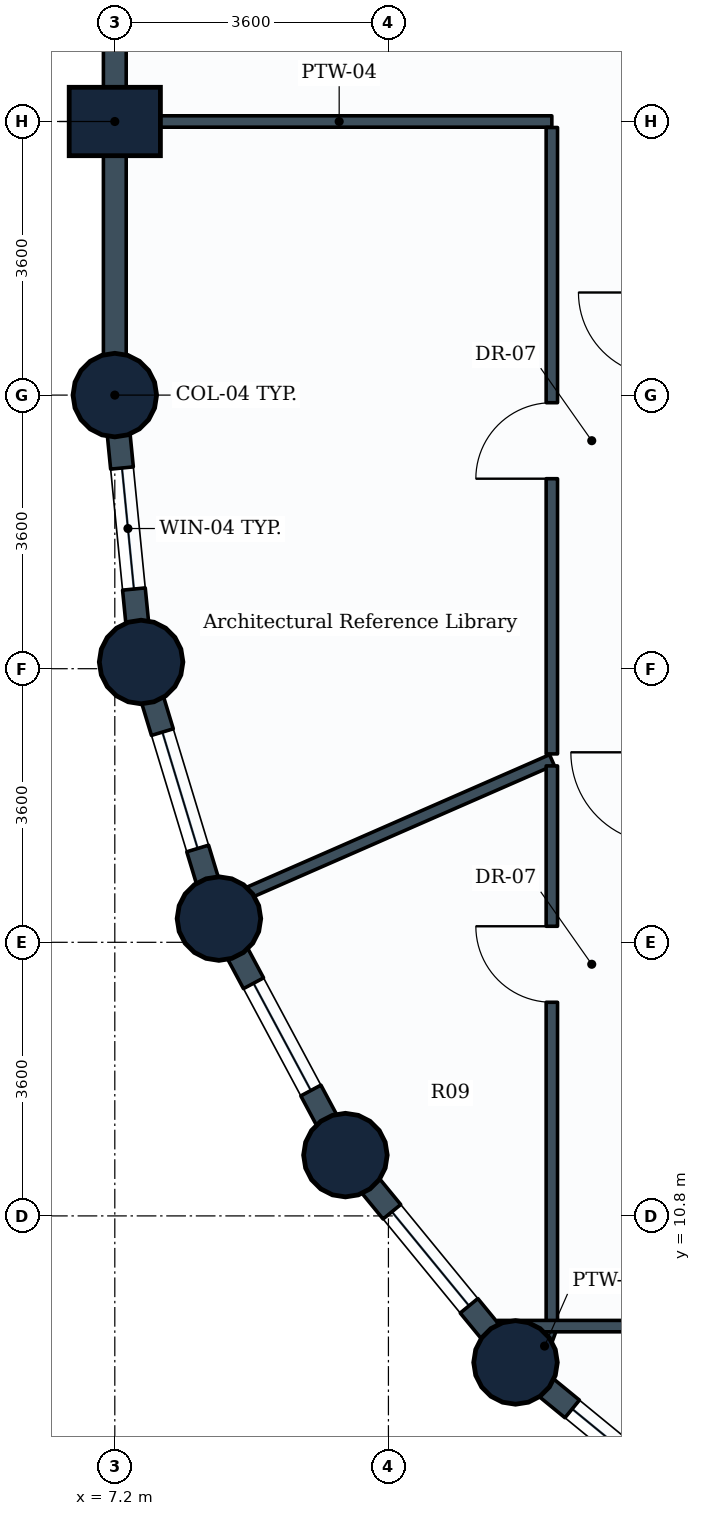
"""IFC4 building model, lengths in metres.
Left out: names, types, materials, properties, quantities, classifications, styles, units other than length and angle.
Written with IfcOpenShell. Run it as: python <this file> out.ifc"""

import sys

from ifc_helpers import new_model, si_unit, direction, frame, frame_2d, origin, origin_2d, place, context, subcontext, project, spatial, rectangle, circle, extrude, element, fill, save


model = new_model("IFC4")
c1 = context("Model", 3, precision=1e-05, world=origin(), true_north=direction((0.0, 1.0)))
c2 = subcontext(c1, "Body", "Model", "MODEL_VIEW")
j1 = project(units=[si_unit("LENGTHUNIT", "METRE"), si_unit("PLANEANGLEUNIT", "RADIAN")], contexts=[c1])
p1 = place(None, origin())
s1 = spatial("IfcSite", under=j1, at=p1, CompositionType="ELEMENT")
p2 = place(p1, origin())
s2 = spatial("IfcBuilding", under=s1, at=p2, CompositionType="ELEMENT")
p3 = place(p2, frame((0.0, 0.0, 43.5)))
s3 = spatial("IfcBuildingStorey", under=s2, at=p3, CompositionType="ELEMENT", Elevation=43.5)
p4 = place(p3, frame((7.2, 21.6, 0.0), z_axis=(0.0, 0.0, 1.0), x_axis=(1.0, 0.0, 0.0)))
e1 = element("IfcColumn", 1, at=p4, inside=s3, PredefinedType="COLUMN", context=c2, shape_type="SweptSolid", body=[
    extrude(circle(Radius=0.55, at=origin_2d()), origin(), (0.0, 0.0, 1.0), 3.9),
])
p5 = place(p3, frame((7.2, 25.2, 0.0), z_axis=(0.0, 0.0, 1.0), x_axis=(0.0, 1.0, 0.0)))
e2 = element("IfcColumn", 2, at=p5, inside=s3, PredefinedType="COLUMN", context=c2, shape_type="SweptSolid", body=[
    extrude(rectangle(XDim=0.9, YDim=1.2, at=origin_2d()), origin(), (0.0, 0.0, 1.0), 3.9),
])
for number, where, z_axis, x_axis in (
    (3, (7.546, 18.088, 0.0), (0.0, 0.0, 1.0), (1.0, 0.0, 0.0)),
    (4, (8.57, 14.712, 0.0), (0.0, 0.0, 1.0), (1.0, 0.0, 0.0)),
    (5, (10.234, 11.6, 0.0), (0.0, 0.0, 1.0), (1.0, 0.0, 0.0)),
    (6, (12.472, 8.872, 0.0), (0.0, 0.0, 1.0), (1.0, 0.0, 0.0)),
):
    element("IfcColumn", number, at=place(p3, frame(where, z_axis=z_axis, x_axis=x_axis)), inside=s3, PredefinedType="COLUMN", context=c2, shape_type="SweptSolid", body=[
        extrude(circle(Radius=0.55, at=origin_2d()), origin(), (0.0, 0.0, 1.0), 3.9),
    ])
p6 = place(p3, frame((7.2, 25.2, 0.0), z_axis=(0.0, 0.0, 1.0), x_axis=(0.0, 1.0, 0.0)))
e7 = element("IfcWall", 7, at=p6, inside=s3, PredefinedType="STANDARD", context=c2, shape_type="SweptSolid", body=[
    extrude(rectangle(XDim=3.6, YDim=0.3, at=frame_2d((1.8, 0.0))), origin(), (0.0, 0.0, 1.0), 2.93),
])
p7 = place(p3, frame((7.2, 21.6, 0.0), z_axis=(0.0, 0.0, 1.0), x_axis=(0.0, 1.0, 0.0)))
e8 = element("IfcWall", 8, at=p7, inside=s3, PredefinedType="STANDARD", context=c2, shape_type="SweptSolid", body=[
    extrude(rectangle(XDim=3.6, YDim=0.3, at=frame_2d((1.8, 0.0))), origin(), (0.0, 0.0, 1.0), 2.93),
])
p8 = place(p3, frame((7.546, 18.088, 0.0), z_axis=(0.0, 0.0, 1.0), x_axis=(-0.09802417461, 0.995184033831, 0.0)))
e9 = element("IfcWall", 9, at=p8, inside=s3, PredefinedType="STANDARD", context=c2, shape_type="SweptSolid", body=[
    extrude(rectangle(XDim=3.529, YDim=0.3, at=frame_2d((1.765, 0.0))), origin(), (0.0, 0.0, 1.0), 2.93),
])
p9 = place(p8, frame((0.965, 0.0, 0.85)))
e10 = element("IfcOpeningElement", 10, at=p9, cuts=e9, PredefinedType="OPENING", context=c2, shape_type="SweptSolid", body=[
    extrude(rectangle(XDim=1.6, YDim=1.35, at=frame_2d((0.8, 0.675))), frame((0.0, 0.16, 0.0), z_axis=(0.0, -1.0, 0.0), x_axis=(1.0, 0.0, 0.0)), (0.0, 0.0, 1.0), 0.32),
])
p10 = place(p3, frame((8.57, 14.712, 0.0), z_axis=(0.0, 0.0, 1.0), x_axis=(-0.290305086481, 0.956934144423, 0.0)))
e11 = element("IfcWall", 11, at=p10, inside=s3, PredefinedType="STANDARD", context=c2, shape_type="SweptSolid", body=[
    extrude(rectangle(XDim=3.528, YDim=0.3, at=frame_2d((1.764, 0.0))), origin(), (0.0, 0.0, 1.0), 2.93),
])
p11 = place(p10, frame((0.964, 0.0, 0.85)))
e12 = element("IfcOpeningElement", 12, at=p11, cuts=e11, PredefinedType="OPENING", context=c2, shape_type="SweptSolid", body=[
    extrude(rectangle(XDim=1.6, YDim=1.35, at=frame_2d((0.8, 0.675))), frame((0.0, 0.16, 0.0), z_axis=(0.0, -1.0, 0.0), x_axis=(1.0, 0.0, 0.0)), (0.0, 0.0, 1.0), 0.32),
])
p12 = place(p3, frame((10.234, 11.6, 0.0), z_axis=(0.0, 0.0, 1.0), x_axis=(-0.47151087309, 0.881860247748, 0.0)))
e13 = element("IfcWall", 13, at=p12, inside=s3, PredefinedType="STANDARD", context=c2, shape_type="SweptSolid", body=[
    extrude(rectangle(XDim=3.529, YDim=0.3, at=frame_2d((1.764, 0.0))), origin(), (0.0, 0.0, 1.0), 2.93),
])
p13 = place(p12, frame((0.964, 0.0, 0.85)))
e14 = element("IfcOpeningElement", 14, at=p13, cuts=e13, PredefinedType="OPENING", context=c2, shape_type="SweptSolid", body=[
    extrude(rectangle(XDim=1.6, YDim=1.35, at=frame_2d((0.8, 0.675))), frame((0.0, 0.16, 0.0), z_axis=(0.0, -1.0, 0.0), x_axis=(1.0, 0.0, 0.0)), (0.0, 0.0, 1.0), 0.32),
])
p14 = place(p3, frame((12.472, 8.872, 0.0), z_axis=(0.0, 0.0, 1.0), x_axis=(-0.634258295121, 0.773121216285, 0.0)))
e15 = element("IfcWall", 15, at=p14, inside=s3, PredefinedType="STANDARD", context=c2, shape_type="SweptSolid", body=[
    extrude(rectangle(XDim=3.529, YDim=0.3, at=frame_2d((1.764, 0.0))), origin(), (0.0, 0.0, 1.0), 2.93),
])
p15 = place(p14, frame((0.964, 0.0, 0.85)))
e16 = element("IfcOpeningElement", 16, at=p15, cuts=e15, PredefinedType="OPENING", context=c2, shape_type="SweptSolid", body=[
    extrude(rectangle(XDim=1.6, YDim=1.35, at=frame_2d((0.8, 0.675))), frame((0.0, 0.16, 0.0), z_axis=(0.0, -1.0, 0.0), x_axis=(1.0, 0.0, 0.0)), (0.0, 0.0, 1.0), 0.32),
])
p16 = place(p3, frame((15.2, 6.634, 0.0), z_axis=(0.0, 0.0, 1.0), x_axis=(-0.773121216285, 0.634258295121, 0.0)))
e17 = element("IfcWall", 17, at=p16, inside=s3, PredefinedType="STANDARD", context=c2, shape_type="SweptSolid", body=[
    extrude(rectangle(XDim=3.529, YDim=0.3, at=frame_2d((1.764, 0.0))), origin(), (0.0, 0.0, 1.0), 2.93),
])
p17 = place(p16, frame((0.964, 0.0, 0.85)))
e18 = element("IfcOpeningElement", 18, at=p17, cuts=e17, PredefinedType="OPENING", context=c2, shape_type="SweptSolid", body=[
    extrude(rectangle(XDim=1.6, YDim=1.35, at=frame_2d((0.8, 0.675))), frame((0.0, 0.16, 0.0), z_axis=(0.0, -1.0, 0.0), x_axis=(1.0, 0.0, 0.0)), (0.0, 0.0, 1.0), 0.32),
])
p18 = place(p3, frame((7.354, 25.2, 0.0), z_axis=(0.0, 0.0, 1.0), x_axis=(1.0, 0.0, 0.0)))
e19 = element("IfcWall", 19, at=p18, inside=s3, PredefinedType="PARTITIONING", context=c2, shape_type="SweptSolid", body=[
    extrude(rectangle(XDim=5.596, YDim=0.15, at=frame_2d((2.798, 0.0))), origin(), (0.0, 0.0, 1.0), 3.635),
])
p19 = place(p3, frame((12.95, 16.8, 0.0), z_axis=(0.0, 0.0, 1.0), x_axis=(-0.916088262031, -0.400976677837, 0.0)))
e20 = element("IfcWall", 20, at=p19, inside=s3, PredefinedType="PARTITIONING", context=c2, shape_type="SweptSolid", body=[
    extrude(rectangle(XDim=4.706, YDim=0.15, at=frame_2d((2.353, 0.0))), origin(), (0.0, 0.0, 1.0), 2.93),
])
p20 = place(p3, frame((12.95, 9.35, 0.0), z_axis=(0.0, 0.0, 1.0), x_axis=(-0.341918365566, -0.939729658619, 0.0)))
e21 = element("IfcWall", 21, at=p20, inside=s3, PredefinedType="PARTITIONING", context=c2, shape_type="SweptSolid", body=[
    extrude(rectangle(XDim=0.559, YDim=0.15, at=frame_2d((0.28, 0.0))), origin(), (0.0, 0.0, 1.0), 2.93),
])
p21 = place(p3, frame((12.95, 16.879, 0.0), z_axis=(0.0, 0.0, 1.0), x_axis=(0.0, 1.0, 0.0)))
e22 = element("IfcWall", 22, at=p21, inside=s3, PredefinedType="PARTITIONING", context=c2, shape_type="SweptSolid", body=[
    extrude(rectangle(XDim=8.242, YDim=0.15, at=frame_2d((4.121, 0.0))), origin(), (0.0, 0.0, 1.0), 3.08),
])
p22 = place(p21, frame((3.621, 0.0, 0.0)))
e23 = element("IfcOpeningElement", 23, at=p22, cuts=e22, PredefinedType="OPENING", context=c2, shape_type="SweptSolid", body=[
    extrude(rectangle(XDim=1.0, YDim=2.1, at=frame_2d((0.5, 1.05))), frame((0.0, 0.085, 0.0), z_axis=(0.0, -1.0, 0.0), x_axis=(1.0, 0.0, 0.0)), (0.0, 0.0, 1.0), 0.17),
])
p23 = place(p3, frame((12.95, 9.35, 0.0), z_axis=(0.0, 0.0, 1.0), x_axis=(0.0, 1.0, 0.0)))
e24 = element("IfcWall", 24, at=p23, inside=s3, PredefinedType="PARTITIONING", context=c2, shape_type="SweptSolid", body=[
    extrude(rectangle(XDim=7.371, YDim=0.15, at=frame_2d((3.686, 0.0))), origin(), (0.0, 0.0, 1.0), 3.04),
])
p24 = place(p23, frame((4.261, 0.0, 0.0)))
e25 = element("IfcOpeningElement", 25, at=p24, cuts=e24, PredefinedType="OPENING", context=c2, shape_type="SweptSolid", body=[
    extrude(rectangle(XDim=1.0, YDim=2.1, at=frame_2d((0.5, 1.05))), frame((0.0, 0.085, 0.0), z_axis=(0.0, -1.0, 0.0), x_axis=(1.0, 0.0, 0.0)), (0.0, 0.0, 1.0), 0.17),
])
p25 = place(p3, frame((12.234, 9.35, 0.0), z_axis=(0.0, 0.0, 1.0), x_axis=(1.0, 0.0, 0.0)))
e26 = element("IfcWall", 26, at=p25, inside=s3, PredefinedType="PARTITIONING", context=c2, shape_type="SweptSolid", body=[
    extrude(rectangle(XDim=8.087, YDim=0.15, at=frame_2d((4.043, 0.0))), origin(), (0.0, 0.0, 1.0), 2.93),
])
p26 = place(p25, frame((4.977, 0.0, 0.0)))
e27 = element("IfcOpeningElement", 27, at=p26, cuts=e26, PredefinedType="OPENING", context=c2, shape_type="SweptSolid", body=[
    extrude(rectangle(XDim=1.0, YDim=2.1, at=frame_2d((0.5, 1.05))), frame((0.0, 0.085, 0.0), z_axis=(0.0, -1.0, 0.0), x_axis=(1.0, 0.0, 0.0)), (0.0, 0.0, 1.0), 0.17),
])
p27 = place(p9, origin())
e28 = element("IfcWindow", 28, at=p27, inside=s3, PartitioningType="SINGLE_PANEL", PredefinedType="WINDOW", context=c2, shape_type="SweptSolid", body=[
    extrude(rectangle(XDim=1.6, YDim=1.35, at=frame_2d((0.8, 0.675))), frame((0.0, 0.03, 0.0), z_axis=(0.0, -1.0, 0.0), x_axis=(1.0, 0.0, 0.0)), (0.0, 0.0, 1.0), 0.06),
])
fill(e10, e28)
p28 = place(p11, origin())
e29 = element("IfcWindow", 29, at=p28, inside=s3, PartitioningType="SINGLE_PANEL", PredefinedType="WINDOW", context=c2, shape_type="SweptSolid", body=[
    extrude(rectangle(XDim=1.6, YDim=1.35, at=frame_2d((0.8, 0.675))), frame((0.0, 0.03, 0.0), z_axis=(0.0, -1.0, 0.0), x_axis=(1.0, 0.0, 0.0)), (0.0, 0.0, 1.0), 0.06),
])
fill(e12, e29)
p29 = place(p13, origin())
e30 = element("IfcWindow", 30, at=p29, inside=s3, PartitioningType="SINGLE_PANEL", PredefinedType="WINDOW", context=c2, shape_type="SweptSolid", body=[
    extrude(rectangle(XDim=1.6, YDim=1.35, at=frame_2d((0.8, 0.675))), frame((0.0, 0.03, 0.0), z_axis=(0.0, -1.0, 0.0), x_axis=(1.0, 0.0, 0.0)), (0.0, 0.0, 1.0), 0.06),
])
fill(e14, e30)
p30 = place(p15, origin())
e31 = element("IfcWindow", 31, at=p30, inside=s3, PartitioningType="SINGLE_PANEL", PredefinedType="WINDOW", context=c2, shape_type="SweptSolid", body=[
    extrude(rectangle(XDim=1.6, YDim=1.35, at=frame_2d((0.8, 0.675))), frame((0.0, 0.03, 0.0), z_axis=(0.0, -1.0, 0.0), x_axis=(1.0, 0.0, 0.0)), (0.0, 0.0, 1.0), 0.06),
])
fill(e16, e31)
p31 = place(p17, origin())
e32 = element("IfcWindow", 32, at=p31, inside=s3, PartitioningType="SINGLE_PANEL", PredefinedType="WINDOW", context=c2, shape_type="SweptSolid", body=[
    extrude(rectangle(XDim=1.6, YDim=1.35, at=frame_2d((0.8, 0.675))), frame((0.0, 0.03, 0.0), z_axis=(0.0, -1.0, 0.0), x_axis=(1.0, 0.0, 0.0)), (0.0, 0.0, 1.0), 0.06),
])
fill(e18, e32)
p32 = place(p22, origin())
e33 = element("IfcDoor", 33, at=p32, inside=s3, OperationType="SINGLE_SWING_LEFT", PredefinedType="DOOR", context=c2, shape_type="SweptSolid", body=[
    extrude(rectangle(XDim=1.0, YDim=2.1, at=frame_2d((0.5, 1.05))), frame((0.0, 0.025, 0.0), z_axis=(0.0, -1.0, 0.0), x_axis=(1.0, 0.0, 0.0)), (0.0, 0.0, 1.0), 0.05),
])
fill(e23, e33)
p33 = place(p24, origin())
e34 = element("IfcDoor", 34, at=p33, inside=s3, OperationType="SINGLE_SWING_RIGHT", PredefinedType="DOOR", context=c2, shape_type="SweptSolid", body=[
    extrude(rectangle(XDim=1.0, YDim=2.1, at=frame_2d((0.5, 1.05))), frame((0.0, 0.025, 0.0), z_axis=(0.0, -1.0, 0.0), x_axis=(1.0, 0.0, 0.0)), (0.0, 0.0, 1.0), 0.05),
])
fill(e25, e34)
save(model, sys.argv[1])
